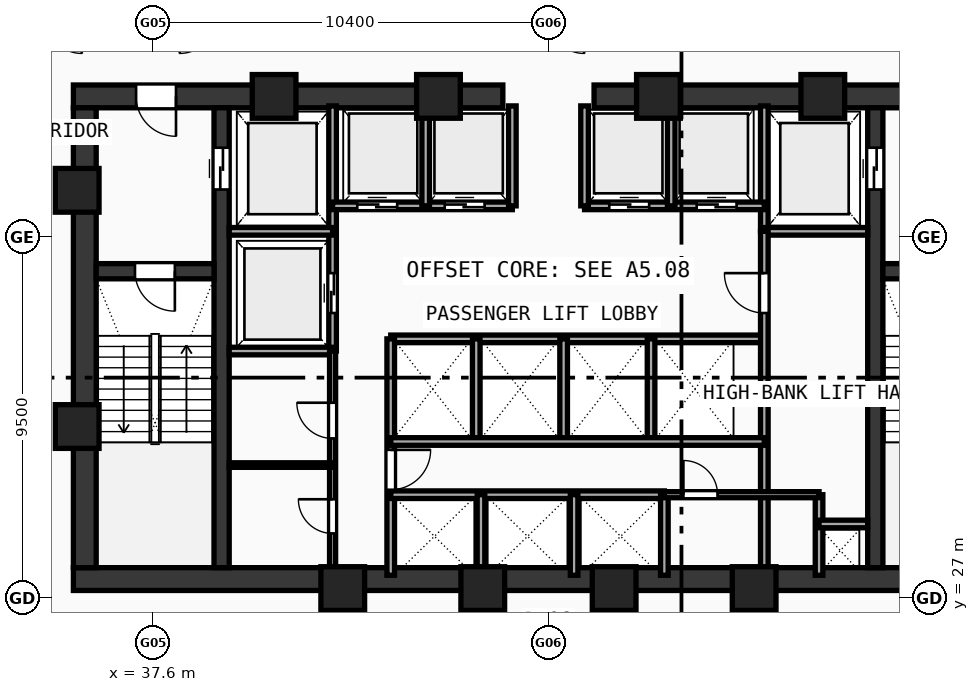
"""IFC4 building model, lengths in metres.
Left out: names, types, materials, properties, quantities, classifications, styles, units other than length and angle.
Written with IfcOpenShell. Run it as: python <this file> out.ifc"""

import sys

from ifc_helpers import new_model, si_unit, direction, frame, frame_2d, origin, origin_with_axes, origin_2d, place, context, subcontext, project, spatial, rectangle, hollow_rectangle, extrude, source, transform, mapped, element, fill, save


model = new_model("IFC4")
c1 = context("Model", 3, precision=1e-05, world=origin(), true_north=direction((0.0, 1.0)))
c2 = subcontext(c1, "Body", "Model", "MODEL_VIEW")
j1 = project(units=[si_unit("LENGTHUNIT", "METRE"), si_unit("PLANEANGLEUNIT", "RADIAN")], contexts=[c1])
p1 = place(None, origin())
s1 = spatial("IfcSite", under=j1, at=p1, CompositionType="ELEMENT")
p2 = place(p1, origin())
s2 = spatial("IfcBuilding", under=s1, at=p2, CompositionType="ELEMENT")
p3 = place(p2, frame((0.0, 0.0, 92.58)))
s3 = spatial("IfcBuildingStorey", under=s2, at=p3, CompositionType="ELEMENT", Elevation=92.58)
p4 = place(p3, frame((35.5, 27.5, 0.0), z_axis=(0.0, 0.0, 1.0), x_axis=(1.0, 0.0, 0.0)))
e1 = element("IfcWall", 1, at=p4, inside=s3, PredefinedType="SHEAR", context=c2, shape_type="SweptSolid", body=[
    extrude(rectangle(XDim=25.0, YDim=0.6, at=frame_2d((12.5, 0.0))), origin(), (0.0, 0.0, 1.0), 3.54),
])
p5 = place(p3, frame((35.5, 40.2, 0.0), z_axis=(0.0, 0.0, 1.0), x_axis=(1.0, 0.0, 0.0)))
e2 = element("IfcWall", 2, at=p5, inside=s3, PredefinedType="SHEAR", context=c2, shape_type="SweptSolid", body=[
    extrude(rectangle(XDim=11.3, YDim=0.6, at=frame_2d((5.65, 0.0))), origin(), (0.0, 0.0, 1.0), 3.54),
])
p6 = place(p5, frame((1.65, 0.0, 0.0)))
e3 = element("IfcOpeningElement", 3, at=p6, cuts=e2, PredefinedType="OPENING", context=c2, shape_type="SweptSolid", body=[
    extrude(rectangle(XDim=1.05, YDim=2.1, at=frame_2d((0.525, 1.05))), frame((0.0, 0.31, 0.0), z_axis=(0.0, -1.0, 0.0), x_axis=(1.0, 0.0, 0.0)), (0.0, 0.0, 1.0), 0.62),
])
p7 = place(p3, frame((49.2, 40.2, 0.0), z_axis=(0.0, 0.0, 1.0), x_axis=(1.0, 0.0, 0.0)))
e4 = element("IfcWall", 4, at=p7, inside=s3, PredefinedType="SHEAR", context=c2, shape_type="SweptSolid", body=[
    extrude(rectangle(XDim=11.3, YDim=0.6, at=frame_2d((5.65, 0.0))), origin(), (0.0, 0.0, 1.0), 3.54),
])
p8 = place(p7, frame((8.6, 0.0, 0.0)))
e5 = element("IfcOpeningElement", 5, at=p8, cuts=e4, PredefinedType="OPENING", context=c2, shape_type="SweptSolid", body=[
    extrude(rectangle(XDim=1.05, YDim=2.1, at=frame_2d((0.525, 1.05))), frame((0.0, 0.31, 0.0), z_axis=(0.0, -1.0, 0.0), x_axis=(1.0, 0.0, 0.0)), (0.0, 0.0, 1.0), 0.62),
])
p9 = place(p3, frame((35.8, 27.8, 0.0), z_axis=(0.0, 0.0, 1.0), x_axis=(0.0, 1.0, 0.0)))
e6 = element("IfcWall", 6, at=p9, inside=s3, PredefinedType="SHEAR", context=c2, shape_type="SweptSolid", body=[
    extrude(rectangle(XDim=12.1, YDim=0.6, at=frame_2d((6.05, 0.0))), origin(), (0.0, 0.0, 1.0), 3.54),
])
p10 = place(p3, frame((39.4, 27.8, 0.0), z_axis=(0.0, 0.0, 1.0), x_axis=(0.0, 1.0, 0.0)))
e7 = element("IfcWall", 7, at=p10, inside=s3, PredefinedType="SHEAR", context=c2, shape_type="SweptSolid", body=[
    extrude(rectangle(XDim=12.1, YDim=0.4, at=frame_2d((6.05, 0.0))), origin(), (0.0, 0.0, 1.0), 3.54),
])
p11 = place(p10, frame((9.95, 0.0, 0.0)))
e8 = element("IfcOpeningElement", 8, at=p11, cuts=e7, PredefinedType="OPENING", context=c2, shape_type="SweptSolid", body=[
    extrude(rectangle(XDim=1.1, YDim=2.1, at=frame_2d((0.55, 1.05))), frame((0.0, 0.21, 0.0), z_axis=(0.0, -1.0, 0.0), x_axis=(1.0, 0.0, 0.0)), (0.0, 0.0, 1.0), 0.42),
])
p12 = place(p3, frame((56.6, 27.8, 0.0), z_axis=(0.0, 0.0, 1.0), x_axis=(0.0, 1.0, 0.0)))
e9 = element("IfcWall", 9, at=p12, inside=s3, PredefinedType="SHEAR", context=c2, shape_type="SweptSolid", body=[
    extrude(rectangle(XDim=12.1, YDim=0.4, at=frame_2d((6.05, 0.0))), origin(), (0.0, 0.0, 1.0), 3.54),
])
p13 = place(p12, frame((9.95, 0.0, 0.0)))
e10 = element("IfcOpeningElement", 10, at=p13, cuts=e9, PredefinedType="OPENING", context=c2, shape_type="SweptSolid", body=[
    extrude(rectangle(XDim=1.1, YDim=2.1, at=frame_2d((0.55, 1.05))), frame((0.0, 0.21, 0.0), z_axis=(0.0, -1.0, 0.0), x_axis=(1.0, 0.0, 0.0)), (0.0, 0.0, 1.0), 0.42),
])
p14 = place(p3, frame((36.1, 35.6, 0.0), z_axis=(0.0, 0.0, 1.0), x_axis=(1.0, 0.0, 0.0)))
e11 = element("IfcWall", 11, at=p14, inside=s3, PredefinedType="SHEAR", context=c2, shape_type="SweptSolid", body=[
    extrude(rectangle(XDim=3.1, YDim=0.4, at=frame_2d((1.55, 0.0))), origin(), (0.0, 0.0, 1.0), 3.54),
])
p15 = place(p14, frame((1.02, 0.0, 0.0)))
e12 = element("IfcOpeningElement", 12, at=p15, cuts=e11, PredefinedType="OPENING", context=c2, shape_type="SweptSolid", body=[
    extrude(rectangle(XDim=1.05, YDim=2.1, at=frame_2d((0.525, 1.05))), frame((0.0, 0.21, 0.0), z_axis=(0.0, -1.0, 0.0), x_axis=(1.0, 0.0, 0.0)), (0.0, 0.0, 1.0), 0.42),
])
p16 = place(p3, frame((56.8, 35.6, 0.0), z_axis=(0.0, 0.0, 1.0), x_axis=(1.0, 0.0, 0.0)))
e13 = element("IfcWall", 13, at=p16, inside=s3, PredefinedType="SHEAR", context=c2, shape_type="SweptSolid", body=[
    extrude(rectangle(XDim=3.1, YDim=0.4, at=frame_2d((1.55, 0.0))), origin(), (0.0, 0.0, 1.0), 3.54),
])
p17 = place(p16, frame((1.02, 0.0, 0.0)))
e14 = element("IfcOpeningElement", 14, at=p17, cuts=e13, PredefinedType="OPENING", context=c2, shape_type="SweptSolid", body=[
    extrude(rectangle(XDim=1.05, YDim=2.1, at=frame_2d((0.525, 1.05))), frame((0.0, 0.21, 0.0), z_axis=(0.0, -1.0, 0.0), x_axis=(1.0, 0.0, 0.0)), (0.0, 0.0, 1.0), 0.42),
])
m1 = source(origin(), c2, "Body", "SweptSolid", [
    extrude(hollow_rectangle(XDim=1.15, YDim=1.15, WallThickness=0.048, at=origin_2d()), origin(), (0.0, 0.0, 1.0), 3.8),
])
for number, where, z_axis, x_axis in (
    (15, (42.588, 27.25, -0.26), (0.0, 0.0, 1.0), (1.0, 0.0, 0.0)),
    (16, (46.272, 27.25, -0.26), (0.0, 0.0, 1.0), (1.0, 0.0, 0.0)),
    (17, (49.729, 27.25, -0.26), (0.0, 0.0, 1.0), (1.0, 0.0, 0.0)),
    (18, (53.412, 27.25, -0.26), (0.0, 0.0, 1.0), (1.0, 0.0, 0.0)),
    (19, (55.219, 40.2, -0.26), (0.0, 0.0, 1.0), (1.0, 0.0, 0.0)),
    (20, (50.894, 40.2, -0.26), (0.0, 0.0, 1.0), (1.0, 0.0, 0.0)),
    (21, (45.106, 40.2, -0.26), (0.0, 0.0, 1.0), (1.0, 0.0, 0.0)),
    (22, (40.781, 40.2, -0.26), (0.0, 0.0, 1.0), (1.0, 0.0, 0.0)),
    (23, (35.6, 37.729, -0.26), (0.0, 0.0, 1.0), (1.0, 0.0, 0.0)),
    (24, (35.6, 31.513, -0.26), (0.0, 0.0, 1.0), (1.0, 0.0, 0.0)),
):
    element("IfcColumn", number, at=place(p3, frame(where, z_axis=z_axis, x_axis=x_axis)), inside=s3, PredefinedType="COLUMN", context=c2, shape_type="MappedRepresentation", body=[
        mapped(m1, transform((0.0, 0.0, 0.0), scale=1.0)),
    ])
p18 = place(p3, frame((42.32, 33.5, 0.0), z_axis=(0.0, 0.0, 1.0), x_axis=(0.0, 1.0, 0.0)))
e25 = element("IfcWall", 25, at=p18, inside=s3, PredefinedType="SOLIDWALL", context=c2, shape_type="SweptSolid", body=[
    extrude(rectangle(XDim=6.45, YDim=0.2, at=frame_2d((3.225, 0.0))), origin(), (0.0, 0.0, 1.0), 3.54),
])
p19 = place(p18, frame((1.0, 0.0, 0.0)))
e26 = element("IfcOpeningElement", 26, at=p19, cuts=e25, PredefinedType="OPENING", context=c2, shape_type="SweptSolid", body=[
    extrude(rectangle(XDim=1.05, YDim=2.1, at=frame_2d((0.525, 1.05))), frame((0.0, 0.11, 0.0), z_axis=(0.0, -1.0, 0.0), x_axis=(1.0, 0.0, 0.0)), (0.0, 0.0, 1.0), 0.22),
])
for number, where, z_axis, x_axis in (
    (27, (39.6, 36.65, 0.0), (0.0, 0.0, 1.0), (1.0, 0.0, 0.0)),
    (28, (39.6, 33.5, 0.0), (0.0, 0.0, 1.0), (1.0, 0.0, 0.0)),
):
    element("IfcWall", number, at=place(p3, frame(where, z_axis=z_axis, x_axis=x_axis)), inside=s3, PredefinedType="SOLIDWALL", context=c2, shape_type="SweptSolid", body=[
        extrude(rectangle(XDim=2.72, YDim=0.2, at=frame_2d((1.36, 0.0))), origin(), (0.0, 0.0, 1.0), 3.54),
    ])
p20 = place(p3, frame((53.68, 36.65, 0.0), z_axis=(0.0, 0.0, 1.0), x_axis=(0.0, 1.0, 0.0)))
e29 = element("IfcWall", 29, at=p20, inside=s3, PredefinedType="SOLIDWALL", context=c2, shape_type="SweptSolid", body=[
    extrude(rectangle(XDim=3.3, YDim=0.2, at=frame_2d((1.65, 0.0))), origin(), (0.0, 0.0, 1.0), 3.54),
])
p21 = place(p3, frame((53.68, 36.65, 0.0), z_axis=(0.0, 0.0, 1.0), x_axis=(1.0, 0.0, 0.0)))
e30 = element("IfcWall", 30, at=p21, inside=s3, PredefinedType="SOLIDWALL", context=c2, shape_type="SweptSolid", body=[
    extrude(rectangle(XDim=2.72, YDim=0.2, at=frame_2d((1.36, 0.0))), origin(), (0.0, 0.0, 1.0), 3.54),
])
p22 = place(p3, frame((42.32, 37.32, 0.0), z_axis=(0.0, 0.0, 1.0), x_axis=(1.0, 0.0, 0.0)))
e31 = element("IfcWall", 31, at=p22, inside=s3, PredefinedType="SOLIDWALL", context=c2, shape_type="SweptSolid", body=[
    extrude(rectangle(XDim=4.73, YDim=0.2, at=frame_2d((2.365, 0.0))), origin(), (0.0, 0.0, 1.0), 3.54),
])
p23 = place(p22, frame((0.65, 0.0, 0.0)))
e32 = element("IfcOpeningElement", 32, at=p23, cuts=e31, PredefinedType="OPENING", context=c2, shape_type="SweptSolid", body=[
    extrude(rectangle(XDim=1.05, YDim=2.1, at=frame_2d((0.525, 1.05))), frame((0.0, 0.11, 0.0), z_axis=(0.0, -1.0, 0.0), x_axis=(1.0, 0.0, 0.0)), (0.0, 0.0, 1.0), 0.22),
])
p24 = place(p22, frame((2.95, 0.0, 0.0)))
e33 = element("IfcOpeningElement", 33, at=p24, cuts=e31, PredefinedType="OPENING", context=c2, shape_type="SweptSolid", body=[
    extrude(rectangle(XDim=1.05, YDim=2.1, at=frame_2d((0.525, 1.05))), frame((0.0, 0.11, 0.0), z_axis=(0.0, -1.0, 0.0), x_axis=(1.0, 0.0, 0.0)), (0.0, 0.0, 1.0), 0.22),
])
p25 = place(p3, frame((48.95, 37.32, 0.0), z_axis=(0.0, 0.0, 1.0), x_axis=(1.0, 0.0, 0.0)))
e34 = element("IfcWall", 34, at=p25, inside=s3, PredefinedType="SOLIDWALL", context=c2, shape_type="SweptSolid", body=[
    extrude(rectangle(XDim=4.73, YDim=0.2, at=frame_2d((2.365, 0.0))), origin(), (0.0, 0.0, 1.0), 3.54),
])
p26 = place(p25, frame((0.65, 0.0, 0.0)))
e35 = element("IfcOpeningElement", 35, at=p26, cuts=e34, PredefinedType="OPENING", context=c2, shape_type="SweptSolid", body=[
    extrude(rectangle(XDim=1.05, YDim=2.1, at=frame_2d((0.525, 1.05))), frame((0.0, 0.11, 0.0), z_axis=(0.0, -1.0, 0.0), x_axis=(1.0, 0.0, 0.0)), (0.0, 0.0, 1.0), 0.22),
])
p27 = place(p25, frame((2.95, 0.0, 0.0)))
e36 = element("IfcOpeningElement", 36, at=p27, cuts=e34, PredefinedType="OPENING", context=c2, shape_type="SweptSolid", body=[
    extrude(rectangle(XDim=1.05, YDim=2.1, at=frame_2d((0.525, 1.05))), frame((0.0, 0.11, 0.0), z_axis=(0.0, -1.0, 0.0), x_axis=(1.0, 0.0, 0.0)), (0.0, 0.0, 1.0), 0.22),
])
for number, where, z_axis, x_axis in (
    (37, (47.05, 37.32, 0.0), (0.0, 0.0, 1.0), (0.0, 1.0, 0.0)),
    (38, (48.95, 37.32, 0.0), (0.0, 0.0, 1.0), (0.0, 1.0, 0.0)),
    (39, (44.77, 37.32, 0.0), (0.0, 0.0, 1.0), (0.0, 1.0, 0.0)),
    (40, (51.23, 37.32, 0.0), (0.0, 0.0, 1.0), (0.0, 1.0, 0.0)),
):
    element("IfcWall", number, at=place(p3, frame(where, z_axis=z_axis, x_axis=x_axis)), inside=s3, PredefinedType="SOLIDWALL", context=c2, shape_type="SweptSolid", body=[
        extrude(rectangle(XDim=2.63, YDim=0.2, at=frame_2d((1.315, 0.0))), origin(), (0.0, 0.0, 1.0), 3.54),
    ])
p28 = place(p3, frame((43.85, 33.82, 0.0), z_axis=(0.0, 0.0, 1.0), x_axis=(1.0, 0.0, 0.0)))
e41 = element("IfcWall", 41, at=p28, inside=s3, PredefinedType="SOLIDWALL", context=c2, shape_type="SweptSolid", body=[
    extrude(rectangle(XDim=9.83, YDim=0.2, at=frame_2d((4.915, 0.0))), origin(), (0.0, 0.0, 1.0), 3.54),
])
p29 = place(p3, frame((43.85, 27.6, 0.0), z_axis=(0.0, 0.0, 1.0), x_axis=(0.0, 1.0, 0.0)))
e42 = element("IfcWall", 42, at=p29, inside=s3, PredefinedType="SOLIDWALL", context=c2, shape_type="SweptSolid", body=[
    extrude(rectangle(XDim=6.22, YDim=0.2, at=frame_2d((3.11, 0.0))), origin(), (0.0, 0.0, 1.0), 3.54),
])
p30 = place(p29, frame((2.25, 0.0, 0.0)))
e43 = element("IfcOpeningElement", 43, at=p30, cuts=e42, PredefinedType="OPENING", context=c2, shape_type="SweptSolid", body=[
    extrude(rectangle(XDim=1.05, YDim=2.1, at=frame_2d((0.525, 1.05))), frame((0.0, 0.11, 0.0), z_axis=(0.0, -1.0, 0.0), x_axis=(1.0, 0.0, 0.0)), (0.0, 0.0, 1.0), 0.22),
])
p31 = place(p3, frame((53.68, 27.6, 0.0), z_axis=(0.0, 0.0, 1.0), x_axis=(0.0, 1.0, 0.0)))
e44 = element("IfcWall", 44, at=p31, inside=s3, PredefinedType="SOLIDWALL", context=c2, shape_type="SweptSolid", body=[
    extrude(rectangle(XDim=9.05, YDim=0.2, at=frame_2d((4.525, 0.0))), origin(), (0.0, 0.0, 1.0), 3.54),
])
p32 = place(p31, frame((6.9, 0.0, 0.0)))
e45 = element("IfcOpeningElement", 45, at=p32, cuts=e44, PredefinedType="OPENING", context=c2, shape_type="SweptSolid", body=[
    extrude(rectangle(XDim=1.05, YDim=2.1, at=frame_2d((0.525, 1.05))), frame((0.0, 0.11, 0.0), z_axis=(0.0, -1.0, 0.0), x_axis=(1.0, 0.0, 0.0)), (0.0, 0.0, 1.0), 0.22),
])
for number, where, z_axis, x_axis in (
    (46, (46.1, 31.12, 0.0), (0.0, 0.0, 1.0), (0.0, 1.0, 0.0)),
    (47, (48.4, 31.12, 0.0), (0.0, 0.0, 1.0), (0.0, 1.0, 0.0)),
    (48, (50.7, 31.12, 0.0), (0.0, 0.0, 1.0), (0.0, 1.0, 0.0)),
):
    element("IfcWall", number, at=place(p3, frame(where, z_axis=z_axis, x_axis=x_axis)), inside=s3, PredefinedType="SOLIDWALL", context=c2, shape_type="SweptSolid", body=[
        extrude(rectangle(XDim=2.7, YDim=0.2, at=frame_2d((1.35, 0.0))), origin(), (0.0, 0.0, 1.0), 3.54),
    ])
p33 = place(p3, frame((43.85, 29.72, 0.0), z_axis=(0.0, 0.0, 1.0), x_axis=(1.0, 0.0, 0.0)))
e49 = element("IfcWall", 49, at=p33, inside=s3, PredefinedType="SOLIDWALL", context=c2, shape_type="SweptSolid", body=[
    extrude(rectangle(XDim=7.2, YDim=0.2, at=frame_2d((3.6, 0.0))), origin(), (0.0, 0.0, 1.0), 3.54),
])
p34 = place(p3, frame((51.05, 27.6, 0.0), z_axis=(0.0, 0.0, 1.0), x_axis=(0.0, 1.0, 0.0)))
e50 = element("IfcWall", 50, at=p34, inside=s3, PredefinedType="SOLIDWALL", context=c2, shape_type="SweptSolid", body=[
    extrude(rectangle(XDim=2.12, YDim=0.2, at=frame_2d((1.06, 0.0))), origin(), (0.0, 0.0, 1.0), 3.54),
])
p35 = place(p3, frame((43.85, 31.12, 0.0), z_axis=(0.0, 0.0, 1.0), x_axis=(1.0, 0.0, 0.0)))
e51 = element("IfcWall", 51, at=p35, inside=s3, PredefinedType="SOLIDWALL", context=c2, shape_type="SweptSolid", body=[
    extrude(rectangle(XDim=9.83, YDim=0.2, at=frame_2d((4.915, 0.0))), origin(), (0.0, 0.0, 1.0), 3.54),
])
for number, where, z_axis, x_axis in (
    (52, (46.225, 27.6, 0.0), (0.0, 0.0, 1.0), (0.0, 1.0, 0.0)),
    (53, (48.675, 27.6, 0.0), (0.0, 0.0, 1.0), (0.0, 1.0, 0.0)),
    (54, (55.12, 27.6, 0.0), (0.0, 0.0, 1.0), (0.0, 1.0, 0.0)),
):
    element("IfcWall", number, at=place(p3, frame(where, z_axis=z_axis, x_axis=x_axis)), inside=s3, PredefinedType="SOLIDWALL", context=c2, shape_type="SweptSolid", body=[
        extrude(rectangle(XDim=2.12, YDim=0.2, at=frame_2d((1.06, 0.0))), origin(), (0.0, 0.0, 1.0), 3.54),
    ])
p36 = place(p3, frame((55.12, 28.95, 0.0), z_axis=(0.0, 0.0, 1.0), x_axis=(1.0, 0.0, 0.0)))
e55 = element("IfcWall", 55, at=p36, inside=s3, PredefinedType="SOLIDWALL", context=c2, shape_type="SweptSolid", body=[
    extrude(rectangle(XDim=1.28, YDim=0.2, at=frame_2d((0.64, 0.0))), origin(), (0.0, 0.0, 1.0), 3.54),
])
p37 = place(p3, frame((42.32, 27.6, 0.0), z_axis=(0.0, 0.0, 1.0), x_axis=(0.0, 1.0, 0.0)))
e56 = element("IfcWall", 56, at=p37, inside=s3, PredefinedType="PARTITIONING", context=c2, shape_type="SweptSolid", body=[
    extrude(rectangle(XDim=5.9, YDim=0.16, at=frame_2d((2.95, 0.0))), origin(), (0.0, 0.0, 1.0), 3.54),
])
p38 = place(p37, frame((1.1, 0.0, 0.0)))
e57 = element("IfcOpeningElement", 57, at=p38, cuts=e56, PredefinedType="OPENING", context=c2, shape_type="SweptSolid", body=[
    extrude(rectangle(XDim=0.9, YDim=2.1, at=frame_2d((0.45, 1.05))), frame((0.0, 0.09, 0.0), z_axis=(0.0, -1.0, 0.0), x_axis=(1.0, 0.0, 0.0)), (0.0, 0.0, 1.0), 0.18),
])
p39 = place(p37, frame((3.6, 0.0, 0.0)))
e58 = element("IfcOpeningElement", 58, at=p39, cuts=e56, PredefinedType="OPENING", context=c2, shape_type="SweptSolid", body=[
    extrude(rectangle(XDim=0.94, YDim=2.1, at=frame_2d((0.47, 1.05))), frame((0.0, 0.09, 0.0), z_axis=(0.0, -1.0, 0.0), x_axis=(1.0, 0.0, 0.0)), (0.0, 0.0, 1.0), 0.18),
])
p40 = place(p3, frame((51.05, 29.72, 0.0), z_axis=(0.0, 0.0, 1.0), x_axis=(1.0, 0.0, 0.0)))
e59 = element("IfcWall", 59, at=p40, inside=s3, PredefinedType="PARTITIONING", context=c2, shape_type="SweptSolid", body=[
    extrude(rectangle(XDim=4.07, YDim=0.16, at=frame_2d((2.035, 0.0))), origin(), (0.0, 0.0, 1.0), 3.54),
])
p41 = place(p40, frame((0.5, 0.0, 0.0)))
e60 = element("IfcOpeningElement", 60, at=p41, cuts=e59, PredefinedType="OPENING", context=c2, shape_type="SweptSolid", body=[
    extrude(rectangle(XDim=0.9, YDim=2.1, at=frame_2d((0.45, 1.05))), frame((0.0, 0.09, 0.0), z_axis=(0.0, -1.0, 0.0), x_axis=(1.0, 0.0, 0.0)), (0.0, 0.0, 1.0), 0.18),
])
p42 = place(p3, frame((39.6, 30.5, 0.0), z_axis=(0.0, 0.0, 1.0), x_axis=(1.0, 0.0, 0.0)))
e61 = element("IfcWall", 61, at=p42, inside=s3, PredefinedType="PARTITIONING", context=c2, shape_type="SweptSolid", body=[
    extrude(rectangle(XDim=2.72, YDim=0.12, at=frame_2d((1.36, 0.0))), origin(), (0.0, 0.0, 1.0), 3.54),
])
m2 = source(origin(), c2, "Body", "SweptSolid", [
    extrude(rectangle(XDim=1.05, YDim=2.1, at=frame_2d((0.525, 1.05))), frame((0.0, 0.025, 0.0), z_axis=(0.0, -1.0, 0.0), x_axis=(1.0, 0.0, 0.0)), (0.0, 0.0, 1.0), 0.05),
])
p43 = place(p15, frame((1.05, 0.0, 0.0), z_axis=(0.0, 0.0, 1.0), x_axis=(-1.0, 0.0, 0.0)))
e62 = element("IfcDoor", 62, at=p43, inside=s3, OperationType="SINGLE_SWING_LEFT", PredefinedType="DOOR", context=c2, shape_type="MappedRepresentation", body=[
    mapped(m2, transform((0.0, 0.0, 0.0), scale=1.0)),
])
fill(e12, e62)
p44 = place(p6, frame((1.05, 0.0, 0.0), z_axis=(0.0, 0.0, 1.0), x_axis=(-1.0, 0.0, 0.0)))
e63 = element("IfcDoor", 63, at=p44, inside=s3, OperationType="SINGLE_SWING_LEFT", PredefinedType="DOOR", context=c2, shape_type="MappedRepresentation", body=[
    mapped(m2, transform((0.0, 0.0, 0.0), scale=1.0)),
])
fill(e3, e63)
m3 = source(origin(), c2, "Body", "SweptSolid", [
    extrude(rectangle(XDim=1.1, YDim=2.1, at=frame_2d((0.55, 1.05))), frame((0.0, 0.025, 0.0), z_axis=(0.0, -1.0, 0.0), x_axis=(1.0, 0.0, 0.0)), (0.0, 0.0, 1.0), 0.05),
])
p45 = place(p11, frame((1.1, 0.0, 0.0), z_axis=(0.0, 0.0, 1.0), x_axis=(-1.0, 0.0, 0.0)))
e64 = element("IfcDoor", 64, at=p45, inside=s3, OperationType="DOUBLE_DOOR_SLIDING", PredefinedType="DOOR", context=c2, shape_type="MappedRepresentation", body=[
    mapped(m3, transform((0.0, 0.0, 0.0), scale=1.0)),
])
fill(e8, e64)
p46 = place(p13, origin_with_axes())
e65 = element("IfcDoor", 65, at=p46, inside=s3, OperationType="DOUBLE_DOOR_SLIDING", PredefinedType="DOOR", context=c2, shape_type="MappedRepresentation", body=[
    mapped(m3, transform((0.0, 0.0, 0.0), scale=1.0)),
])
fill(e10, e65)
p47 = place(p19, origin_with_axes())
e66 = element("IfcDoor", 66, at=p47, inside=s3, OperationType="DOUBLE_DOOR_SLIDING", PredefinedType="DOOR", context=c2, shape_type="MappedRepresentation", body=[
    mapped(m2, transform((0.0, 0.0, 0.0), scale=1.0)),
])
fill(e26, e66)
p48 = place(p23, frame((1.05, 0.0, 0.0), z_axis=(0.0, 0.0, 1.0), x_axis=(-1.0, 0.0, 0.0)))
e67 = element("IfcDoor", 67, at=p48, inside=s3, OperationType="DOUBLE_DOOR_SLIDING", PredefinedType="DOOR", context=c2, shape_type="MappedRepresentation", body=[
    mapped(m2, transform((0.0, 0.0, 0.0), scale=1.0)),
])
fill(e32, e67)
p49 = place(p24, frame((1.05, 0.0, 0.0), z_axis=(0.0, 0.0, 1.0), x_axis=(-1.0, 0.0, 0.0)))
e68 = element("IfcDoor", 68, at=p49, inside=s3, OperationType="DOUBLE_DOOR_SLIDING", PredefinedType="DOOR", context=c2, shape_type="MappedRepresentation", body=[
    mapped(m2, transform((0.0, 0.0, 0.0), scale=1.0)),
])
fill(e33, e68)
p50 = place(p26, frame((1.05, 0.0, 0.0), z_axis=(0.0, 0.0, 1.0), x_axis=(-1.0, 0.0, 0.0)))
e69 = element("IfcDoor", 69, at=p50, inside=s3, OperationType="DOUBLE_DOOR_SLIDING", PredefinedType="DOOR", context=c2, shape_type="MappedRepresentation", body=[
    mapped(m2, transform((0.0, 0.0, 0.0), scale=1.0)),
])
fill(e35, e69)
p51 = place(p27, frame((1.05, 0.0, 0.0), z_axis=(0.0, 0.0, 1.0), x_axis=(-1.0, 0.0, 0.0)))
e70 = element("IfcDoor", 70, at=p51, inside=s3, OperationType="DOUBLE_DOOR_SLIDING", PredefinedType="DOOR", context=c2, shape_type="MappedRepresentation", body=[
    mapped(m2, transform((0.0, 0.0, 0.0), scale=1.0)),
])
fill(e36, e70)
p52 = place(p30, frame((1.05, 0.0, 0.0), z_axis=(0.0, 0.0, 1.0), x_axis=(-1.0, 0.0, 0.0)))
e71 = element("IfcDoor", 71, at=p52, inside=s3, OperationType="SINGLE_SWING_LEFT", PredefinedType="DOOR", context=c2, shape_type="MappedRepresentation", body=[
    mapped(m2, transform((0.0, 0.0, 0.0), scale=1.0)),
])
fill(e43, e71)
p53 = place(p32, origin_with_axes())
e72 = element("IfcDoor", 72, at=p53, inside=s3, OperationType="SINGLE_SWING_RIGHT", PredefinedType="DOOR", context=c2, shape_type="MappedRepresentation", body=[
    mapped(m2, transform((0.0, 0.0, 0.0), scale=1.0)),
])
fill(e45, e72)
m4 = source(origin(), c2, "Body", "SweptSolid", [
    extrude(rectangle(XDim=0.9, YDim=2.1, at=frame_2d((0.45, 1.05))), frame((0.0, 0.025, 0.0), z_axis=(0.0, -1.0, 0.0), x_axis=(1.0, 0.0, 0.0)), (0.0, 0.0, 1.0), 0.05),
])
p54 = place(p38, origin_with_axes())
e73 = element("IfcDoor", 73, at=p54, inside=s3, OperationType="SINGLE_SWING_RIGHT", PredefinedType="DOOR", context=c2, shape_type="MappedRepresentation", body=[
    mapped(m4, transform((0.0, 0.0, 0.0), scale=1.0)),
])
fill(e57, e73)
m5 = source(origin(), c2, "Body", "SweptSolid", [
    extrude(rectangle(XDim=0.94, YDim=2.1, at=frame_2d((0.47, 1.05))), frame((0.0, 0.025, 0.0), z_axis=(0.0, -1.0, 0.0), x_axis=(1.0, 0.0, 0.0)), (0.0, 0.0, 1.0), 0.05),
])
p55 = place(p39, origin_with_axes())
e74 = element("IfcDoor", 74, at=p55, inside=s3, OperationType="SINGLE_SWING_RIGHT", PredefinedType="DOOR", context=c2, shape_type="MappedRepresentation", body=[
    mapped(m5, transform((0.0, 0.0, 0.0), scale=1.0)),
])
fill(e58, e74)
p56 = place(p41, origin_with_axes())
e75 = element("IfcDoor", 75, at=p56, inside=s3, OperationType="SINGLE_SWING_LEFT", PredefinedType="DOOR", context=c2, shape_type="MappedRepresentation", body=[
    mapped(m4, transform((0.0, 0.0, 0.0), scale=1.0)),
])
fill(e60, e75)
save(model, sys.argv[1])
